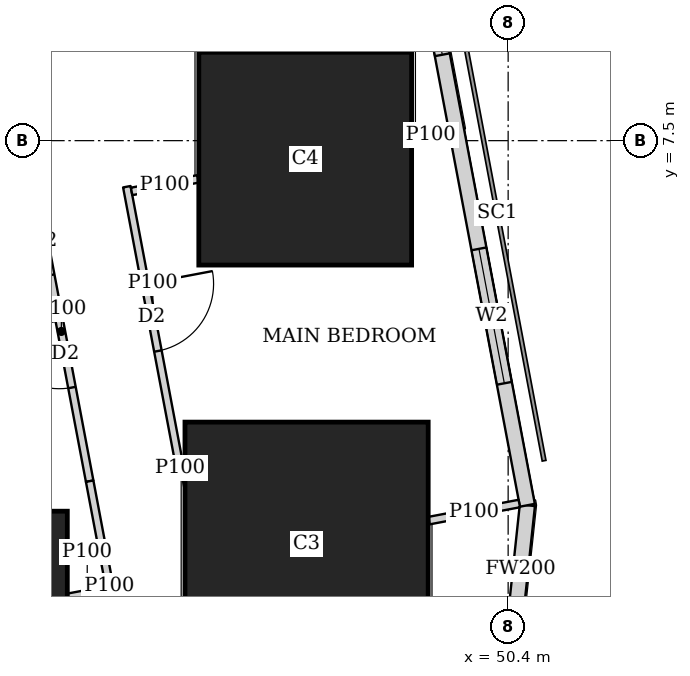
"""IFC4 building model, lengths in metres.
Left out: names, types, materials, properties, quantities, classifications, styles, units other than length and angle.
Written with IfcOpenShell. Run it as: python <this file> out.ifc"""

import sys

from ifc_helpers import new_model, si_unit, direction, frame, frame_2d, origin, origin_2d, place, context, subcontext, project, spatial, rectangle, extrude, element, fill, save


model = new_model("IFC4")
c1 = context("Model", 3, precision=1e-05, world=origin(), true_north=direction((0.0, 1.0)))
c2 = subcontext(c1, "Body", "Model", "MODEL_VIEW")
j1 = project(units=[si_unit("LENGTHUNIT", "METRE"), si_unit("PLANEANGLEUNIT", "RADIAN")], contexts=[c1])
p1 = place(None, origin())
s1 = spatial("IfcSite", under=j1, at=p1, CompositionType="ELEMENT")
p2 = place(p1, origin())
s2 = spatial("IfcBuilding", under=s1, at=p2, CompositionType="ELEMENT")
p3 = place(p2, frame((0.0, 0.0, 31.25)))
s3 = spatial("IfcBuildingStorey", under=s2, at=p3, CompositionType="ELEMENT", Elevation=31.25)
p4 = place(p3, frame((43.2, 1.225, 0.0), z_axis=(0.0, 0.0, 1.0), x_axis=(1.0, 0.0, 0.0)))
e1 = element("IfcColumn", 1, at=p4, inside=s3, PredefinedType="COLUMN", context=c2, shape_type="SweptSolid", body=[
    extrude(rectangle(XDim=2.8, YDim=2.8, at=origin_2d()), origin(), (0.0, 0.0, 1.0), 3.75),
])
p5 = place(p3, frame((47.748, 2.197, 0.0), z_axis=(0.0, 0.0, 1.0), x_axis=(1.0, 0.0, 0.0)))
e2 = element("IfcColumn", 2, at=p5, inside=s3, PredefinedType="COLUMN", context=c2, shape_type="SweptSolid", body=[
    extrude(rectangle(XDim=3.2, YDim=3.2, at=origin_2d()), origin(), (0.0, 0.0, 1.0), 3.75),
])
p6 = place(p3, frame((47.73, 7.263, 0.0), z_axis=(0.0, 0.0, 1.0), x_axis=(1.0, 0.0, 0.0)))
e3 = element("IfcColumn", 3, at=p6, inside=s3, PredefinedType="COLUMN", context=c2, shape_type="SweptSolid", body=[
    extrude(rectangle(XDim=2.8, YDim=2.8, at=origin_2d()), origin(), (0.0, 0.0, 1.0), 3.75),
])
p7 = place(p3, frame((50.474, 1.025, 0.0), z_axis=(0.0, 0.0, 1.0), x_axis=(0.106047815515, 0.994361031429, 0.0)))
e4 = element("IfcWall", 4, at=p7, inside=s3, PredefinedType="SOLIDWALL", context=c2, shape_type="SweptSolid", body=[
    extrude(rectangle(XDim=1.688, YDim=0.2, at=frame_2d((0.844, 0.0))), origin(), (0.0, 0.0, 1.0), 3.5),
])
p8 = place(p3, frame((50.653, 2.703, 0.0), z_axis=(0.0, 0.0, 1.0), x_axis=(-0.185612026696, 0.982623109613, 0.0)))
e5 = element("IfcWall", 5, at=p8, inside=s3, PredefinedType="SOLIDWALL", context=c2, shape_type="SweptSolid", body=[
    extrude(rectangle(XDim=41.393, YDim=0.2, at=frame_2d((20.697, 0.0))), origin(), (0.0, 0.0, 1.0), 3.5),
])
p9 = place(p8, frame((1.633, 0.0, 0.9)))
e6 = element("IfcOpeningElement", 6, at=p9, cuts=e5, PredefinedType="OPENING", context=c2, shape_type="SweptSolid", body=[
    extrude(rectangle(XDim=1.8, YDim=1.5, at=frame_2d((0.9, 0.75))), frame((0.0, 0.11, 0.0), z_axis=(0.0, -1.0, 0.0), x_axis=(1.0, 0.0, 0.0)), (0.0, 0.0, 1.0), 0.22),
])
p10 = place(p8, frame((6.032, 0.0, 0.9)))
e7 = element("IfcOpeningElement", 7, at=p10, cuts=e5, PredefinedType="OPENING", context=c2, shape_type="SweptSolid", body=[
    extrude(rectangle(XDim=1.8, YDim=1.5, at=frame_2d((0.9, 0.75))), frame((0.0, 0.11, 0.0), z_axis=(0.0, -1.0, 0.0), x_axis=(1.0, 0.0, 0.0)), (0.0, 0.0, 1.0), 0.22),
])
p11 = place(p8, frame((9.848, 0.0, 0.9)))
e8 = element("IfcOpeningElement", 8, at=p11, cuts=e5, PredefinedType="OPENING", context=c2, shape_type="SweptSolid", body=[
    extrude(rectangle(XDim=1.8, YDim=1.5, at=frame_2d((0.9, 0.75))), frame((0.0, 0.11, 0.0), z_axis=(0.0, -1.0, 0.0), x_axis=(1.0, 0.0, 0.0)), (0.0, 0.0, 1.0), 0.22),
])
p12 = place(p8, frame((17.481, 0.0, 0.9)))
e9 = element("IfcOpeningElement", 9, at=p12, cuts=e5, PredefinedType="OPENING", context=c2, shape_type="SweptSolid", body=[
    extrude(rectangle(XDim=1.8, YDim=1.5, at=frame_2d((0.9, 0.75))), frame((0.0, 0.11, 0.0), z_axis=(0.0, -1.0, 0.0), x_axis=(1.0, 0.0, 0.0)), (0.0, 0.0, 1.0), 0.22),
])
p13 = place(p8, frame((21.297, 0.0, 0.9)))
e10 = element("IfcOpeningElement", 10, at=p13, cuts=e5, PredefinedType="OPENING", context=c2, shape_type="SweptSolid", body=[
    extrude(rectangle(XDim=1.8, YDim=1.5, at=frame_2d((0.9, 0.75))), frame((0.0, 0.11, 0.0), z_axis=(0.0, -1.0, 0.0), x_axis=(1.0, 0.0, 0.0)), (0.0, 0.0, 1.0), 0.22),
])
p14 = place(p8, frame((25.113, 0.0, 0.9)))
e11 = element("IfcOpeningElement", 11, at=p14, cuts=e5, PredefinedType="OPENING", context=c2, shape_type="SweptSolid", body=[
    extrude(rectangle(XDim=1.8, YDim=1.5, at=frame_2d((0.9, 0.75))), frame((0.0, 0.11, 0.0), z_axis=(0.0, -1.0, 0.0), x_axis=(1.0, 0.0, 0.0)), (0.0, 0.0, 1.0), 0.22),
])
p15 = place(p8, frame((28.93, 0.0, 0.9)))
e12 = element("IfcOpeningElement", 12, at=p15, cuts=e5, PredefinedType="OPENING", context=c2, shape_type="SweptSolid", body=[
    extrude(rectangle(XDim=1.8, YDim=1.5, at=frame_2d((0.9, 0.75))), frame((0.0, 0.11, 0.0), z_axis=(0.0, -1.0, 0.0), x_axis=(1.0, 0.0, 0.0)), (0.0, 0.0, 1.0), 0.22),
])
p16 = place(p8, frame((32.746, 0.0, 0.9)))
e13 = element("IfcOpeningElement", 13, at=p16, cuts=e5, PredefinedType="OPENING", context=c2, shape_type="SweptSolid", body=[
    extrude(rectangle(XDim=1.8, YDim=1.5, at=frame_2d((0.9, 0.75))), frame((0.0, 0.11, 0.0), z_axis=(0.0, -1.0, 0.0), x_axis=(1.0, 0.0, 0.0)), (0.0, 0.0, 1.0), 0.22),
])
p17 = place(p8, frame((36.481, 0.0, 0.9)))
e14 = element("IfcOpeningElement", 14, at=p17, cuts=e5, PredefinedType="OPENING", context=c2, shape_type="SweptSolid", body=[
    extrude(rectangle(XDim=1.8, YDim=1.5, at=frame_2d((0.9, 0.75))), frame((0.0, 0.11, 0.0), z_axis=(0.0, -1.0, 0.0), x_axis=(1.0, 0.0, 0.0)), (0.0, 0.0, 1.0), 0.22),
])
p18 = place(p3, frame((45.383, 6.894, 0.0), z_axis=(0.0, 0.0, 1.0), x_axis=(0.185791461635, -0.982589198385, 0.0)))
e15 = element("IfcWall", 15, at=p18, inside=s3, PredefinedType="PARTITIONING", context=c2, shape_type="SweptSolid", body=[
    extrude(rectangle(XDim=3.687, YDim=0.1, at=frame_2d((1.844, 0.0))), origin(), (0.0, 0.0, 1.0), 3.5),
])
p19 = place(p18, frame((1.3, 0.0, 0.0)))
e16 = element("IfcOpeningElement", 16, at=p19, cuts=e15, PredefinedType="OPENING", context=c2, shape_type="SweptSolid", body=[
    extrude(rectangle(XDim=0.9, YDim=2.1, at=frame_2d((0.45, 1.05))), frame((0.0, 0.06, 0.0), z_axis=(0.0, -1.0, 0.0), x_axis=(1.0, 0.0, 0.0)), (0.0, 0.0, 1.0), 0.12),
])
p20 = place(p3, frame((46.068, 3.271, 0.0), z_axis=(0.0, 0.0, 1.0), x_axis=(0.183590240121, -0.98300286049, 0.0)))
e17 = element("IfcWall", 17, at=p20, inside=s3, PredefinedType="PARTITIONING", context=c2, shape_type="SweptSolid", body=[
    extrude(rectangle(XDim=0.169, YDim=0.1, at=frame_2d((0.084, 0.0))), origin(), (0.0, 0.0, 1.0), 2.05),
])
p21 = place(p3, frame((44.149, 6.96, 0.0), z_axis=(0.0, 0.0, 1.0), x_axis=(0.185824941804, -0.982582867245, 0.0)))
e18 = element("IfcWall", 18, at=p21, inside=s3, PredefinedType="PARTITIONING", context=c2, shape_type="SweptSolid", body=[
    extrude(rectangle(XDim=4.01, YDim=0.1, at=frame_2d((2.005, 0.0))), origin(), (0.0, 0.0, 1.0), 3.5),
])
p22 = place(p21, frame((0.35, 0.0, 0.0)))
e19 = element("IfcOpeningElement", 19, at=p22, cuts=e18, PredefinedType="OPENING", context=c2, shape_type="SweptSolid", body=[
    extrude(rectangle(XDim=0.9, YDim=2.1, at=frame_2d((0.45, 1.05))), frame((0.0, 0.06, 0.0), z_axis=(0.0, -1.0, 0.0), x_axis=(1.0, 0.0, 0.0)), (0.0, 0.0, 1.0), 0.12),
])
p23 = place(p21, frame((1.856, 0.0, 0.0)))
e20 = element("IfcOpeningElement", 20, at=p23, cuts=e18, PredefinedType="OPENING", context=c2, shape_type="SweptSolid", body=[
    extrude(rectangle(XDim=0.9, YDim=2.1, at=frame_2d((0.45, 1.05))), frame((0.0, 0.06, 0.0), z_axis=(0.0, -1.0, 0.0), x_axis=(1.0, 0.0, 0.0)), (0.0, 0.0, 1.0), 0.12),
])
p24 = place(p3, frame((44.894, 3.02, 0.0), z_axis=(0.0, 0.0, 1.0), x_axis=(0.185471317237, -0.982649678412, 0.0)))
e21 = element("IfcWall", 21, at=p24, inside=s3, PredefinedType="PARTITIONING", context=c2, shape_type="SweptSolid", body=[
    extrude(rectangle(XDim=2.804, YDim=0.1, at=frame_2d((1.402, 0.0))), origin(), (0.0, 0.0, 1.0), 2.05),
])
p25 = place(p3, frame((49.622, 7.62, 0.0), z_axis=(0.0, 0.0, 1.0), x_axis=(-0.982629142467, -0.185580086147, 0.0)))
e22 = element("IfcWall", 22, at=p25, inside=s3, PredefinedType="PARTITIONING", context=c2, shape_type="SweptSolid", body=[
    extrude(rectangle(XDim=0.491, YDim=0.1, at=frame_2d((0.245, 0.0))), origin(), (0.0, 0.0, 1.0), 3.5),
])
p26 = place(p3, frame((46.32, 6.997, 0.0), z_axis=(0.0, 0.0, 1.0), x_axis=(-0.982635224332, -0.185547880349, 0.0)))
e23 = element("IfcWall", 23, at=p26, inside=s3, PredefinedType="PARTITIONING", context=c2, shape_type="SweptSolid", body=[
    extrude(rectangle(XDim=0.889, YDim=0.1, at=frame_2d((0.445, 0.0))), origin(), (0.0, 0.0, 1.0), 3.5),
])
p27 = place(p3, frame((50.547, 2.726, 0.0), z_axis=(0.0, 0.0, 1.0), x_axis=(-0.982553313503, -0.185981144539, 0.0)))
e24 = element("IfcWall", 24, at=p27, inside=s3, PredefinedType="PARTITIONING", context=c2, shape_type="SweptSolid", body=[
    extrude(rectangle(XDim=1.21, YDim=0.1, at=frame_2d((0.605, 0.0))), origin(), (0.0, 0.0, 1.0), 3.5),
])
p28 = place(p3, frame((45.114, 1.587, 0.0), z_axis=(0.0, 0.0, 1.0), x_axis=(-0.982699277433, -0.185208342501, 0.0)))
e25 = element("IfcWall", 25, at=p28, inside=s3, PredefinedType="PARTITIONING", context=c2, shape_type="SweptSolid", body=[
    extrude(rectangle(XDim=0.513, YDim=0.1, at=frame_2d((0.256, 0.0))), origin(), (0.0, 0.0, 1.0), 2.05),
])
p29 = place(p9, origin())
e26 = element("IfcWindow", 26, at=p29, inside=s3, PartitioningType="SINGLE_PANEL", PredefinedType="WINDOW", context=c2, shape_type="SweptSolid", body=[
    extrude(rectangle(XDim=1.8, YDim=1.5, at=frame_2d((0.9, 0.75))), frame((0.0, 0.03, 0.0), z_axis=(0.0, -1.0, 0.0), x_axis=(1.0, 0.0, 0.0)), (0.0, 0.0, 1.0), 0.06),
])
fill(e6, e26)
p30 = place(p10, origin())
e27 = element("IfcWindow", 27, at=p30, inside=s3, PartitioningType="SINGLE_PANEL", PredefinedType="WINDOW", context=c2, shape_type="SweptSolid", body=[
    extrude(rectangle(XDim=1.8, YDim=1.5, at=frame_2d((0.9, 0.75))), frame((0.0, 0.03, 0.0), z_axis=(0.0, -1.0, 0.0), x_axis=(1.0, 0.0, 0.0)), (0.0, 0.0, 1.0), 0.06),
])
fill(e7, e27)
p31 = place(p19, origin())
e28 = element("IfcDoor", 28, at=p31, inside=s3, OperationType="SINGLE_SWING_LEFT", PredefinedType="DOOR", context=c2, shape_type="SweptSolid", body=[
    extrude(rectangle(XDim=0.9, YDim=2.1, at=frame_2d((0.45, 1.05))), frame((0.0, 0.025, 0.0), z_axis=(0.0, -1.0, 0.0), x_axis=(1.0, 0.0, 0.0)), (0.0, 0.0, 1.0), 0.05),
])
fill(e16, e28)
p32 = place(p22, origin())
e29 = element("IfcDoor", 29, at=p32, inside=s3, OperationType="SINGLE_SWING_RIGHT", PredefinedType="DOOR", context=c2, shape_type="SweptSolid", body=[
    extrude(rectangle(XDim=0.9, YDim=2.1, at=frame_2d((0.45, 1.05))), frame((0.0, 0.025, 0.0), z_axis=(0.0, -1.0, 0.0), x_axis=(1.0, 0.0, 0.0)), (0.0, 0.0, 1.0), 0.05),
])
fill(e19, e29)
p33 = place(p23, origin())
e30 = element("IfcDoor", 30, at=p33, inside=s3, OperationType="SINGLE_SWING_RIGHT", PredefinedType="DOOR", context=c2, shape_type="SweptSolid", body=[
    extrude(rectangle(XDim=0.9, YDim=2.1, at=frame_2d((0.45, 1.05))), frame((0.0, 0.025, 0.0), z_axis=(0.0, -1.0, 0.0), x_axis=(1.0, 0.0, 0.0)), (0.0, 0.0, 1.0), 0.05),
])
fill(e20, e30)
save(model, sys.argv[1])
